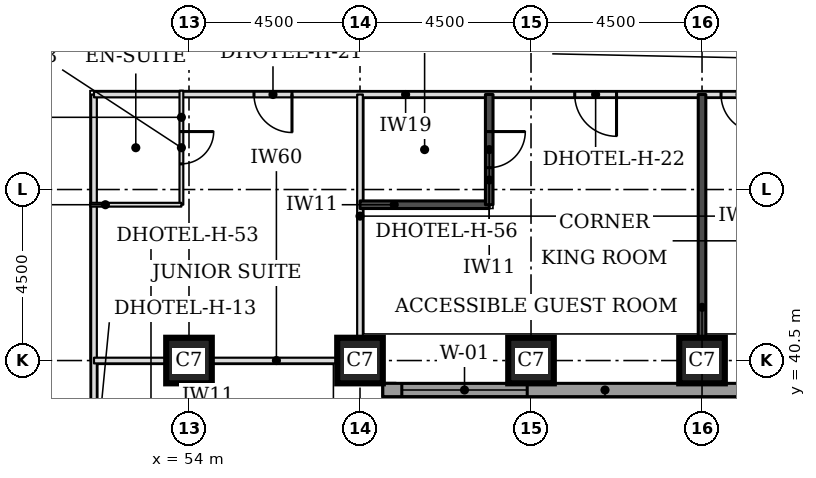
"""IFC4 building model, lengths in metres.
Left out: names, types, materials, properties, quantities, classifications, styles, units other than length and angle.
Written with IfcOpenShell. Run it as: python <this file> out.ifc"""

import sys

from ifc_helpers import new_model, si_unit, direction, frame, frame_2d, origin, origin_2d, place, context, subcontext, project, spatial, rectangle, extrude, element, fill, save


model = new_model("IFC4")
c1 = context("Model", 3, precision=1e-05, world=origin(), true_north=direction((0.0, 1.0)))
c2 = subcontext(c1, "Body", "Model", "MODEL_VIEW")
j1 = project(units=[si_unit("LENGTHUNIT", "METRE"), si_unit("PLANEANGLEUNIT", "RADIAN")], contexts=[c1])
p1 = place(None, origin())
s1 = spatial("IfcSite", under=j1, at=p1, CompositionType="ELEMENT")
p2 = place(p1, origin())
s2 = spatial("IfcBuilding", under=s1, at=p2, CompositionType="ELEMENT")
p3 = place(p2, frame((0.0, 0.0, 46.2)))
s3 = spatial("IfcBuildingStorey", under=s2, at=p3, CompositionType="ELEMENT", Elevation=46.2)
for number, where, z_axis, x_axis in (
    (1, (54.0, 40.5, 0.0), (0.0, 0.0, 1.0), (1.0, 0.0, 0.0)),
    (2, (58.5, 40.5, 0.0), (0.0, 0.0, 1.0), (1.0, 0.0, 0.0)),
    (3, (63.0, 40.5, 0.0), (0.0, 0.0, 1.0), (1.0, 0.0, 0.0)),
    (4, (67.5, 40.5, 0.0), (0.0, 0.0, 1.0), (1.0, 0.0, 0.0)),
):
    element("IfcColumn", number, at=place(p3, frame(where, z_axis=z_axis, x_axis=x_axis)), inside=s3, PredefinedType="COLUMN", context=c2, shape_type="SweptSolid", body=[
        extrude(rectangle(XDim=1.2, YDim=1.2, at=origin_2d()), origin(), (0.0, 0.0, 1.0), 3.3),
    ])
p4 = place(p3, frame((59.275, 22.106, 0.0), z_axis=(0.0, 0.0, 1.0), x_axis=(0.0, 1.0, 0.0)))
e5 = element("IfcWall", 5, at=p4, inside=s3, PredefinedType="STANDARD", context=c2, shape_type="SweptSolid", body=[
    extrude(rectangle(XDim=17.793, YDim=0.35, at=frame_2d((8.897, 0.0))), origin(), (0.0, 0.0, 1.0), 3.055),
])
p5 = place(p4, frame((5.493, 0.0, 0.8)))
e6 = element("IfcOpeningElement", 6, at=p5, cuts=e5, PredefinedType="OPENING", context=c2, shape_type="SweptSolid", body=[
    extrude(rectangle(XDim=3.3, YDim=1.5, at=frame_2d((1.65, 0.75))), frame((0.0, 0.185, 0.0), z_axis=(0.0, -1.0, 0.0), x_axis=(1.0, 0.0, 0.0)), (0.0, 0.0, 1.0), 0.37),
])
p6 = place(p4, frame((13.993, 0.0, 0.8)))
e7 = element("IfcOpeningElement", 7, at=p6, cuts=e5, PredefinedType="OPENING", context=c2, shape_type="SweptSolid", body=[
    extrude(rectangle(XDim=3.3, YDim=1.5, at=frame_2d((1.65, 0.75))), frame((0.0, 0.185, 0.0), z_axis=(0.0, -1.0, 0.0), x_axis=(1.0, 0.0, 0.0)), (0.0, 0.0, 1.0), 0.37),
])
p7 = place(p3, frame((59.1, 39.725, 0.0), z_axis=(0.0, 0.0, 1.0), x_axis=(1.0, 0.0, 0.0)))
e8 = element("IfcWall", 8, at=p7, inside=s3, PredefinedType="STANDARD", context=c2, shape_type="SweptSolid", body=[
    extrude(rectangle(XDim=13.293, YDim=0.35, at=frame_2d((6.647, 0.0))), origin(), (0.0, 0.0, 1.0), 3.055),
])
p8 = place(p7, frame((0.5, 0.0, 0.8)))
e9 = element("IfcOpeningElement", 9, at=p8, cuts=e8, PredefinedType="OPENING", context=c2, shape_type="SweptSolid", body=[
    extrude(rectangle(XDim=3.3, YDim=1.5, at=frame_2d((1.65, 0.75))), frame((0.0, 0.185, 0.0), z_axis=(0.0, -1.0, 0.0), x_axis=(1.0, 0.0, 0.0)), (0.0, 0.0, 1.0), 0.37),
])
p9 = place(p3, frame((51.5, 25.15, 0.0), z_axis=(0.0, 0.0, 1.0), x_axis=(0.0, 1.0, 0.0)))
e10 = element("IfcWall", 10, at=p9, inside=s3, PredefinedType="PARTITIONING", context=c2, shape_type="SweptSolid", body=[
    extrude(rectangle(XDim=22.35, YDim=0.15, at=frame_2d((11.175, 0.0))), origin(), (0.0, 0.0, 1.0), 3.08),
])
p10 = place(p9, frame((0.347, 0.0, 0.0)))
e11 = element("IfcOpeningElement", 11, at=p10, cuts=e10, PredefinedType="OPENING", context=c2, shape_type="SweptSolid", body=[
    extrude(rectangle(XDim=1.0, YDim=2.1, at=frame_2d((0.5, 1.05))), frame((0.0, 0.085, 0.0), z_axis=(0.0, -1.0, 0.0), x_axis=(1.0, 0.0, 0.0)), (0.0, 0.0, 1.0), 0.17),
])
p11 = place(p9, frame((7.325, 0.0, 0.0)))
e12 = element("IfcOpeningElement", 12, at=p11, cuts=e10, PredefinedType="OPENING", context=c2, shape_type="SweptSolid", body=[
    extrude(rectangle(XDim=1.0, YDim=2.1, at=frame_2d((0.5, 1.05))), frame((0.0, 0.085, 0.0), z_axis=(0.0, -1.0, 0.0), x_axis=(1.0, 0.0, 0.0)), (0.0, 0.0, 1.0), 0.17),
])
p12 = place(p9, frame((11.675, 0.0, 0.0)))
e13 = element("IfcOpeningElement", 13, at=p12, cuts=e10, PredefinedType="OPENING", context=c2, shape_type="SweptSolid", body=[
    extrude(rectangle(XDim=1.0, YDim=2.1, at=frame_2d((0.5, 1.05))), frame((0.0, 0.085, 0.0), z_axis=(0.0, -1.0, 0.0), x_axis=(1.0, 0.0, 0.0)), (0.0, 0.0, 1.0), 0.17),
])
p13 = place(p3, frame((51.5, 47.5, 0.0), z_axis=(0.0, 0.0, 1.0), x_axis=(1.0, 0.0, 0.0)))
e14 = element("IfcWall", 14, at=p13, inside=s3, PredefinedType="PARTITIONING", context=c2, shape_type="SweptSolid", body=[
    extrude(rectangle(XDim=18.0, YDim=0.15, at=frame_2d((9.0, 0.0))), origin(), (0.0, 0.0, 1.0), 3.08),
])
p14 = place(p13, frame((12.65, 0.0, 0.0)))
e15 = element("IfcOpeningElement", 15, at=p14, cuts=e14, PredefinedType="OPENING", context=c2, shape_type="SweptSolid", body=[
    extrude(rectangle(XDim=1.1, YDim=2.1, at=frame_2d((0.55, 1.05))), frame((0.0, 0.085, 0.0), z_axis=(0.0, -1.0, 0.0), x_axis=(1.0, 0.0, 0.0)), (0.0, 0.0, 1.0), 0.17),
])
p15 = place(p13, frame((16.5, 0.0, 0.0)))
e16 = element("IfcOpeningElement", 16, at=p15, cuts=e14, PredefinedType="OPENING", context=c2, shape_type="SweptSolid", body=[
    extrude(rectangle(XDim=1.0, YDim=2.1, at=frame_2d((0.5, 1.05))), frame((0.0, 0.085, 0.0), z_axis=(0.0, -1.0, 0.0), x_axis=(1.0, 0.0, 0.0)), (0.0, 0.0, 1.0), 0.17),
])
p16 = place(p13, frame((4.21, 0.0, 0.0)))
e17 = element("IfcOpeningElement", 17, at=p16, cuts=e14, PredefinedType="OPENING", context=c2, shape_type="SweptSolid", body=[
    extrude(rectangle(XDim=1.0, YDim=2.1, at=frame_2d((0.5, 1.05))), frame((0.0, 0.085, 0.0), z_axis=(0.0, -1.0, 0.0), x_axis=(1.0, 0.0, 0.0)), (0.0, 0.0, 1.0), 0.17),
])
p17 = place(p3, frame((54.5, 38.65, 0.0), z_axis=(0.0, 0.0, 1.0), x_axis=(0.0, 1.0, 0.0)))
e18 = element("IfcWall", 18, at=p17, inside=s3, PredefinedType="SOLIDWALL", context=c2, shape_type="SweptSolid", body=[
    extrude(rectangle(XDim=1.85, YDim=0.2, at=frame_2d((0.925, 0.0))), origin(), (0.0, 0.0, 1.0), 3.08),
])
p18 = place(p3, frame((67.5, 41.1, 0.0), z_axis=(0.0, 0.0, 1.0), x_axis=(0.0, 1.0, 0.0)))
e19 = element("IfcWall", 19, at=p18, inside=s3, PredefinedType="SOLIDWALL", context=c2, shape_type="SweptSolid", body=[
    extrude(rectangle(XDim=6.4, YDim=0.2, at=frame_2d((3.2, 0.0))), origin(), (0.0, 0.0, 1.0), 3.08),
])
p19 = place(p3, frame((58.5, 44.6, 0.0), z_axis=(0.0, 0.0, 1.0), x_axis=(1.0, 0.0, 0.0)))
e20 = element("IfcWall", 20, at=p19, inside=s3, PredefinedType="SOLIDWALL", context=c2, shape_type="SweptSolid", body=[
    extrude(rectangle(XDim=3.4, YDim=0.2, at=frame_2d((1.7, 0.0))), origin(), (0.0, 0.0, 1.0), 3.08),
])
p20 = place(p3, frame((61.9, 44.6, 0.0), z_axis=(0.0, 0.0, 1.0), x_axis=(0.0, 1.0, 0.0)))
e21 = element("IfcWall", 21, at=p20, inside=s3, PredefinedType="SOLIDWALL", context=c2, shape_type="SweptSolid", body=[
    extrude(rectangle(XDim=2.9, YDim=0.2, at=frame_2d((1.45, 0.0))), origin(), (0.0, 0.0, 1.0), 3.08),
])
p21 = place(p20, frame((0.975, 0.0, 0.0)))
e22 = element("IfcOpeningElement", 22, at=p21, cuts=e21, PredefinedType="OPENING", context=c2, shape_type="SweptSolid", body=[
    extrude(rectangle(XDim=0.95, YDim=2.1, at=frame_2d((0.475, 1.05))), frame((0.0, 0.11, 0.0), z_axis=(0.0, -1.0, 0.0), x_axis=(1.0, 0.0, 0.0)), (0.0, 0.0, 1.0), 0.22),
])
p22 = place(p3, frame((51.5, 40.5, 0.0), z_axis=(0.0, 0.0, 1.0), x_axis=(1.0, 0.0, 0.0)))
e23 = element("IfcWall", 23, at=p22, inside=s3, PredefinedType="PARTITIONING", context=c2, shape_type="SweptSolid", body=[
    extrude(rectangle(XDim=6.4, YDim=0.15, at=frame_2d((3.2, 0.0))), origin(), (0.0, 0.0, 1.0), 2.33),
])
p23 = place(p3, frame((58.5, 41.1, 0.0), z_axis=(0.0, 0.0, 1.0), x_axis=(0.0, 1.0, 0.0)))
e24 = element("IfcWall", 24, at=p23, inside=s3, PredefinedType="PARTITIONING", context=c2, shape_type="SweptSolid", body=[
    extrude(rectangle(XDim=6.4, YDim=0.15, at=frame_2d((3.2, 0.0))), origin(), (0.0, 0.0, 1.0), 3.08),
])
p24 = place(p3, frame((53.8, 47.6, 0.0), z_axis=(0.0, 0.0, 1.0), x_axis=(0.0, -1.0, 0.0)))
e25 = element("IfcWall", 25, at=p24, inside=s3, PredefinedType="PARTITIONING", context=c2, shape_type="SweptSolid", body=[
    extrude(rectangle(XDim=3.0, YDim=0.1, at=frame_2d((1.5, 0.0))), origin(), (0.0, 0.0, 1.0), 3.08),
])
p25 = place(p24, frame((1.075, 0.0, 0.0)))
e26 = element("IfcOpeningElement", 26, at=p25, cuts=e25, PredefinedType="OPENING", context=c2, shape_type="SweptSolid", body=[
    extrude(rectangle(XDim=0.85, YDim=2.1, at=frame_2d((0.425, 1.05))), frame((0.0, 0.06, 0.0), z_axis=(0.0, -1.0, 0.0), x_axis=(1.0, 0.0, 0.0)), (0.0, 0.0, 1.0), 0.12),
])
p26 = place(p3, frame((53.8, 44.6, 0.0), z_axis=(0.0, 0.0, 1.0), x_axis=(-1.0, 0.0, 0.0)))
e27 = element("IfcWall", 27, at=p26, inside=s3, PredefinedType="PARTITIONING", context=c2, shape_type="SweptSolid", body=[
    extrude(rectangle(XDim=2.4, YDim=0.1, at=frame_2d((1.2, 0.0))), origin(), (0.0, 0.0, 1.0), 3.08),
])
p27 = place(p8, origin())
e28 = element("IfcWindow", 28, at=p27, inside=s3, PartitioningType="SINGLE_PANEL", PredefinedType="WINDOW", context=c2, shape_type="SweptSolid", body=[
    extrude(rectangle(XDim=3.3, YDim=1.5, at=frame_2d((1.65, 0.75))), frame((0.0, 0.085, 0.0), z_axis=(0.0, -1.0, 0.0), x_axis=(1.0, 0.0, 0.0)), (0.0, 0.0, 1.0), 0.06),
])
fill(e9, e28)
p28 = place(p14, frame((1.1, 0.0, 0.0), z_axis=(0.0, 0.0, 1.0), x_axis=(-1.0, 0.0, 0.0)))
e29 = element("IfcDoor", 29, at=p28, inside=s3, OperationType="SINGLE_SWING_LEFT", PredefinedType="DOOR", context=c2, shape_type="SweptSolid", body=[
    extrude(rectangle(XDim=1.1, YDim=2.1, at=frame_2d((0.55, 1.05))), frame((0.0, 0.025, 0.0), z_axis=(0.0, -1.0, 0.0), x_axis=(1.0, 0.0, 0.0)), (0.0, 0.0, 1.0), 0.05),
])
fill(e15, e29)
p29 = place(p21, frame((0.95, 0.0, 0.0), z_axis=(0.0, 0.0, 1.0), x_axis=(-1.0, 0.0, 0.0)))
e30 = element("IfcDoor", 30, at=p29, inside=s3, OperationType="SINGLE_SWING_LEFT", PredefinedType="DOOR", context=c2, shape_type="SweptSolid", body=[
    extrude(rectangle(XDim=0.95, YDim=2.1, at=frame_2d((0.475, 1.05))), frame((0.0, 0.025, 0.0), z_axis=(0.0, -1.0, 0.0), x_axis=(1.0, 0.0, 0.0)), (0.0, 0.0, 1.0), 0.05),
])
fill(e22, e30)
p30 = place(p15, frame((1.0, 0.0, 0.0), z_axis=(0.0, 0.0, 1.0), x_axis=(-1.0, 0.0, 0.0)))
e31 = element("IfcDoor", 31, at=p30, inside=s3, OperationType="SINGLE_SWING_LEFT", PredefinedType="DOOR", context=c2, shape_type="SweptSolid", body=[
    extrude(rectangle(XDim=1.0, YDim=2.1, at=frame_2d((0.5, 1.05))), frame((0.0, 0.025, 0.0), z_axis=(0.0, -1.0, 0.0), x_axis=(1.0, 0.0, 0.0)), (0.0, 0.0, 1.0), 0.05),
])
fill(e16, e31)
p31 = place(p16, frame((1.0, 0.0, 0.0), z_axis=(0.0, 0.0, 1.0), x_axis=(-1.0, 0.0, 0.0)))
e32 = element("IfcDoor", 32, at=p31, inside=s3, OperationType="SINGLE_SWING_LEFT", PredefinedType="DOOR", context=c2, shape_type="SweptSolid", body=[
    extrude(rectangle(XDim=1.0, YDim=2.1, at=frame_2d((0.5, 1.05))), frame((0.0, 0.025, 0.0), z_axis=(0.0, -1.0, 0.0), x_axis=(1.0, 0.0, 0.0)), (0.0, 0.0, 1.0), 0.05),
])
fill(e17, e32)
p32 = place(p25, origin())
e33 = element("IfcDoor", 33, at=p32, inside=s3, OperationType="SINGLE_SWING_LEFT", PredefinedType="DOOR", context=c2, shape_type="SweptSolid", body=[
    extrude(rectangle(XDim=0.85, YDim=2.1, at=frame_2d((0.425, 1.05))), frame((0.0, 0.025, 0.0), z_axis=(0.0, -1.0, 0.0), x_axis=(1.0, 0.0, 0.0)), (0.0, 0.0, 1.0), 0.05),
])
fill(e26, e33)
save(model, sys.argv[1])
